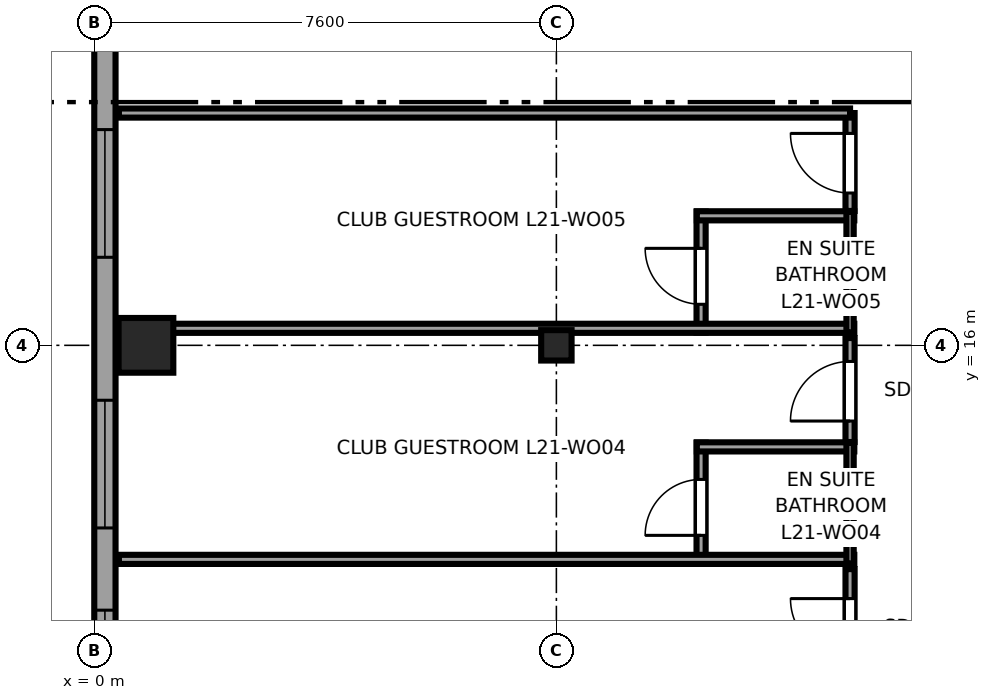
"""IFC4 building model, lengths in metres.
Left out: names, types, materials, properties, quantities, classifications, styles, units other than length and angle.
Written with IfcOpenShell. Run it as: python <this file> out.ifc"""

import sys

from ifc_helpers import new_model, si_unit, direction, frame, frame_2d, origin, origin_2d, place, context, subcontext, project, spatial, rectangle, i_section, extrude, source, transform, mapped, element, fill, save


model = new_model("IFC4")
c1 = context("Model", 3, precision=1e-05, world=origin(), true_north=direction((0.0, 1.0)))
c2 = subcontext(c1, "Body", "Model", "MODEL_VIEW")
j1 = project(units=[si_unit("LENGTHUNIT", "METRE"), si_unit("PLANEANGLEUNIT", "RADIAN")], contexts=[c1])
p1 = place(None, origin())
s1 = spatial("IfcSite", under=j1, at=p1, CompositionType="ELEMENT")
p2 = place(p1, origin())
s2 = spatial("IfcBuilding", under=s1, at=p2, CompositionType="ELEMENT")
p3 = place(p2, frame((0.0, 0.0, 85.25)))
s3 = spatial("IfcBuildingStorey", under=s2, at=p3, CompositionType="ELEMENT", Elevation=85.25)
m1 = source(origin(), c2, "Body", "SweptSolid", [
    extrude(rectangle(XDim=0.9, YDim=0.9, at=origin_2d()), origin(), (0.0, 0.0, 1.0), 3.55),
])
p4 = place(p3, frame((0.85, 16.0, 0.0), z_axis=(0.0, 0.0, 1.0), x_axis=(1.0, 0.0, 0.0)))
e1 = element("IfcColumn", 1, at=p4, inside=s3, PredefinedType="COLUMN", context=c2, shape_type="MappedRepresentation", body=[
    mapped(m1, transform((0.0, 0.0, 0.0), x_axis=(1.0, 0.0, 0.0), y_axis=(0.0, 1.0, 0.0), z_axis=(0.0, 0.0, 1.0), scale=1.0)),
])
m2 = source(origin(), c2, "Body", "SweptSolid", [
    extrude(i_section(OverallWidth=0.5, OverallDepth=0.5, WebThickness=0.022, FlangeThickness=0.034, at=origin_2d()), origin(), (0.0, 0.0, 1.0), 3.55),
])
p5 = place(p3, frame((7.6, 16.0, 0.0), z_axis=(0.0, 0.0, 1.0), x_axis=(1.0, 0.0, 0.0)))
e2 = element("IfcColumn", 2, at=p5, inside=s3, PredefinedType="COLUMN", context=c2, shape_type="MappedRepresentation", body=[
    mapped(m2, transform((0.0, 0.0, 0.0), x_axis=(1.0, 0.0, 0.0), y_axis=(0.0, 1.0, 0.0), z_axis=(0.0, 0.0, 1.0), scale=1.0)),
])
p6 = place(p3, frame((0.175, 41.383, 0.0), z_axis=(0.0, 0.0, 1.0), x_axis=(0.0, -1.0, 0.0)))
e3 = element("IfcWall", 3, at=p6, inside=s3, PredefinedType="SOLIDWALL", context=c2, shape_type="SweptSolid", body=[
    extrude(rectangle(XDim=36.766, YDim=0.35, at=frame_2d((18.383, 0.0))), origin(), (0.0, 0.0, 1.0), 3.37),
])
p7 = place(p6, frame((1.526, 0.0, 0.68)))
e4 = element("IfcOpeningElement", 4, at=p7, cuts=e3, PredefinedType="OPENING", context=c2, shape_type="SweptSolid", body=[
    extrude(rectangle(XDim=2.1, YDim=1.9, at=frame_2d((1.05, 0.95))), frame((0.0, 0.185, 0.0), z_axis=(0.0, -1.0, 0.0), x_axis=(1.0, 0.0, 0.0)), (0.0, 0.0, 1.0), 0.37),
])
p8 = place(p6, frame((4.428, 0.0, 0.68)))
e5 = element("IfcOpeningElement", 5, at=p8, cuts=e3, PredefinedType="OPENING", context=c2, shape_type="SweptSolid", body=[
    extrude(rectangle(XDim=2.1, YDim=1.9, at=frame_2d((1.05, 0.95))), frame((0.0, 0.185, 0.0), z_axis=(0.0, -1.0, 0.0), x_axis=(1.0, 0.0, 0.0)), (0.0, 0.0, 1.0), 0.37),
])
p9 = place(p6, frame((8.879, 0.0, 0.68)))
e6 = element("IfcOpeningElement", 6, at=p9, cuts=e3, PredefinedType="OPENING", context=c2, shape_type="SweptSolid", body=[
    extrude(rectangle(XDim=2.1, YDim=1.9, at=frame_2d((1.05, 0.95))), frame((0.0, 0.185, 0.0), z_axis=(0.0, -1.0, 0.0), x_axis=(1.0, 0.0, 0.0)), (0.0, 0.0, 1.0), 0.37),
])
p10 = place(p6, frame((21.835, 0.0, 0.68)))
e7 = element("IfcOpeningElement", 7, at=p10, cuts=e3, PredefinedType="OPENING", context=c2, shape_type="SweptSolid", body=[
    extrude(rectangle(XDim=2.1, YDim=1.9, at=frame_2d((1.05, 0.95))), frame((0.0, 0.185, 0.0), z_axis=(0.0, -1.0, 0.0), x_axis=(1.0, 0.0, 0.0)), (0.0, 0.0, 1.0), 0.37),
])
p11 = place(p6, frame((26.286, 0.0, 0.68)))
e8 = element("IfcOpeningElement", 8, at=p11, cuts=e3, PredefinedType="OPENING", context=c2, shape_type="SweptSolid", body=[
    extrude(rectangle(XDim=2.1, YDim=1.9, at=frame_2d((1.05, 0.95))), frame((0.0, 0.185, 0.0), z_axis=(0.0, -1.0, 0.0), x_axis=(1.0, 0.0, 0.0)), (0.0, 0.0, 1.0), 0.37),
])
p12 = place(p6, frame((29.738, 0.0, 0.68)))
e9 = element("IfcOpeningElement", 9, at=p12, cuts=e3, PredefinedType="OPENING", context=c2, shape_type="SweptSolid", body=[
    extrude(rectangle(XDim=2.1, YDim=1.9, at=frame_2d((1.05, 0.95))), frame((0.0, 0.185, 0.0), z_axis=(0.0, -1.0, 0.0), x_axis=(1.0, 0.0, 0.0)), (0.0, 0.0, 1.0), 0.37),
])
p13 = place(p6, frame((34.079, 0.0, 0.62)))
e10 = element("IfcOpeningElement", 10, at=p13, cuts=e3, PredefinedType="OPENING", context=c2, shape_type="SweptSolid", body=[
    extrude(rectangle(XDim=1.5, YDim=1.55, at=frame_2d((0.75, 0.775))), frame((0.0, 0.185, 0.0), z_axis=(0.0, -1.0, 0.0), x_axis=(1.0, 0.0, 0.0)), (0.0, 0.0, 1.0), 0.37),
])
p14 = place(p6, frame((16.838, 0.0, 0.62)))
e11 = element("IfcOpeningElement", 11, at=p14, cuts=e3, PredefinedType="OPENING", context=c2, shape_type="SweptSolid", body=[
    extrude(rectangle(XDim=1.5, YDim=1.55, at=frame_2d((0.75, 0.775))), frame((0.0, 0.185, 0.0), z_axis=(0.0, -1.0, 0.0), x_axis=(1.0, 0.0, 0.0)), (0.0, 0.0, 1.0), 0.37),
])
p15 = place(p3, frame((9.98, 12.41, 0.0), z_axis=(0.0, 0.0, 1.0), x_axis=(0.0, 1.0, 0.0)))
e12 = element("IfcWall", 12, at=p15, inside=s3, PredefinedType="PARTITIONING", context=c2, shape_type="SweptSolid", body=[
    extrude(rectangle(XDim=1.99, YDim=0.15, at=frame_2d((0.995, 0.0))), origin(), (0.0, 0.0, 1.0), 3.37),
])
p16 = place(p15, frame((0.465, 0.0, 0.0)))
e13 = element("IfcOpeningElement", 13, at=p16, cuts=e12, PredefinedType="OPENING", context=c2, shape_type="SweptSolid", body=[
    extrude(rectangle(XDim=0.92, YDim=2.01, at=frame_2d((0.46, 1.005))), frame((0.0, 0.085, 0.0), z_axis=(0.0, -1.0, 0.0), x_axis=(1.0, 0.0, 0.0)), (0.0, 0.0, 1.0), 0.17),
])
p17 = place(p3, frame((0.405, 12.48, 0.0), z_axis=(0.0, 0.0, 1.0), x_axis=(1.0, 0.0, 0.0)))
e14 = element("IfcWall", 14, at=p17, inside=s3, PredefinedType="PARTITIONING", context=c2, shape_type="SweptSolid", body=[
    extrude(rectangle(XDim=12.095, YDim=0.15, at=frame_2d((6.047, 0.0))), origin(), (0.0, 0.0, 1.0), 3.37),
])
p18 = place(p3, frame((9.91, 14.33, 0.0), z_axis=(0.0, 0.0, 1.0), x_axis=(1.0, 0.0, 0.0)))
e15 = element("IfcWall", 15, at=p18, inside=s3, PredefinedType="PARTITIONING", context=c2, shape_type="SweptSolid", body=[
    extrude(rectangle(XDim=2.59, YDim=0.15, at=frame_2d((1.295, 0.0))), origin(), (0.0, 0.0, 1.0), 3.37),
])
p19 = place(p3, frame((12.43, 12.41, 0.0), z_axis=(0.0, 0.0, 1.0), x_axis=(0.0, 1.0, 0.0)))
e16 = element("IfcWall", 16, at=p19, inside=s3, PredefinedType="PLUMBINGWALL", context=c2, shape_type="SweptSolid", body=[
    extrude(rectangle(XDim=1.99, YDim=0.12, at=frame_2d((0.995, 0.0))), origin(), (0.0, 0.0, 1.0), 3.37),
])
p20 = place(p3, frame((9.98, 16.21, 0.0), z_axis=(0.0, 0.0, 1.0), x_axis=(0.0, 1.0, 0.0)))
e17 = element("IfcWall", 17, at=p20, inside=s3, PredefinedType="PARTITIONING", context=c2, shape_type="SweptSolid", body=[
    extrude(rectangle(XDim=1.99, YDim=0.15, at=frame_2d((0.995, 0.0))), origin(), (0.0, 0.0, 1.0), 3.37),
])
p21 = place(p20, frame((0.465, 0.0, 0.0)))
e18 = element("IfcOpeningElement", 18, at=p21, cuts=e17, PredefinedType="OPENING", context=c2, shape_type="SweptSolid", body=[
    extrude(rectangle(XDim=0.92, YDim=2.01, at=frame_2d((0.46, 1.005))), frame((0.0, 0.085, 0.0), z_axis=(0.0, -1.0, 0.0), x_axis=(1.0, 0.0, 0.0)), (0.0, 0.0, 1.0), 0.17),
])
p22 = place(p3, frame((0.405, 16.28, 0.0), z_axis=(0.0, 0.0, 1.0), x_axis=(1.0, 0.0, 0.0)))
e19 = element("IfcWall", 19, at=p22, inside=s3, PredefinedType="PARTITIONING", context=c2, shape_type="SweptSolid", body=[
    extrude(rectangle(XDim=12.095, YDim=0.15, at=frame_2d((6.047, 0.0))), origin(), (0.0, 0.0, 1.0), 3.37),
])
p23 = place(p3, frame((9.91, 18.13, 0.0), z_axis=(0.0, 0.0, 1.0), x_axis=(1.0, 0.0, 0.0)))
e20 = element("IfcWall", 20, at=p23, inside=s3, PredefinedType="PARTITIONING", context=c2, shape_type="SweptSolid", body=[
    extrude(rectangle(XDim=2.59, YDim=0.15, at=frame_2d((1.295, 0.0))), origin(), (0.0, 0.0, 1.0), 3.37),
])
p24 = place(p3, frame((12.43, 16.21, 0.0), z_axis=(0.0, 0.0, 1.0), x_axis=(0.0, 1.0, 0.0)))
e21 = element("IfcWall", 21, at=p24, inside=s3, PredefinedType="PLUMBINGWALL", context=c2, shape_type="SweptSolid", body=[
    extrude(rectangle(XDim=1.99, YDim=0.12, at=frame_2d((0.995, 0.0))), origin(), (0.0, 0.0, 1.0), 3.37),
])
p25 = place(p3, frame((12.43, 10.41, 0.0), z_axis=(0.0, 0.0, 1.0), x_axis=(0.0, 1.0, 0.0)))
e22 = element("IfcWall", 22, at=p25, inside=s3, PredefinedType="PARTITIONING", context=c2, shape_type="SweptSolid", body=[
    extrude(rectangle(XDim=1.91, YDim=0.15, at=frame_2d((0.955, 0.0))), origin(), (0.0, 0.0, 1.0), 3.37),
])
p26 = place(p25, frame((0.445, 0.0, 0.0)))
e23 = element("IfcOpeningElement", 23, at=p26, cuts=e22, PredefinedType="OPENING", context=c2, shape_type="SweptSolid", body=[
    extrude(rectangle(XDim=0.98, YDim=2.12, at=frame_2d((0.49, 1.06))), frame((0.0, 0.085, 0.0), z_axis=(0.0, -1.0, 0.0), x_axis=(1.0, 0.0, 0.0)), (0.0, 0.0, 1.0), 0.17),
])
p27 = place(p3, frame((12.43, 14.41, 0.0), z_axis=(0.0, 0.0, 1.0), x_axis=(0.0, 1.0, 0.0)))
e24 = element("IfcWall", 24, at=p27, inside=s3, PredefinedType="PARTITIONING", context=c2, shape_type="SweptSolid", body=[
    extrude(rectangle(XDim=1.71, YDim=0.15, at=frame_2d((0.855, 0.0))), origin(), (0.0, 0.0, 1.0), 3.37),
])
p28 = place(p27, frame((0.345, 0.0, 0.0)))
e25 = element("IfcOpeningElement", 25, at=p28, cuts=e24, PredefinedType="OPENING", context=c2, shape_type="SweptSolid", body=[
    extrude(rectangle(XDim=0.98, YDim=2.12, at=frame_2d((0.49, 1.06))), frame((0.0, 0.085, 0.0), z_axis=(0.0, -1.0, 0.0), x_axis=(1.0, 0.0, 0.0)), (0.0, 0.0, 1.0), 0.17),
])
p29 = place(p3, frame((12.43, 18.21, 0.0), z_axis=(0.0, 0.0, 1.0), x_axis=(0.0, 1.0, 0.0)))
e26 = element("IfcWall", 26, at=p29, inside=s3, PredefinedType="PARTITIONING", context=c2, shape_type="SweptSolid", body=[
    extrude(rectangle(XDim=1.61, YDim=0.15, at=frame_2d((0.805, 0.0))), origin(), (0.0, 0.0, 1.0), 3.37),
])
p30 = place(p29, frame((0.295, 0.0, 0.0)))
e27 = element("IfcOpeningElement", 27, at=p30, cuts=e26, PredefinedType="OPENING", context=c2, shape_type="SweptSolid", body=[
    extrude(rectangle(XDim=0.98, YDim=2.12, at=frame_2d((0.49, 1.06))), frame((0.0, 0.085, 0.0), z_axis=(0.0, -1.0, 0.0), x_axis=(1.0, 0.0, 0.0)), (0.0, 0.0, 1.0), 0.17),
])
p31 = place(p3, frame((0.405, 19.82, 0.0), z_axis=(0.0, 0.0, 1.0), x_axis=(1.0, 0.0, 0.0)))
e28 = element("IfcWall", 28, at=p31, inside=s3, PredefinedType="PARTITIONING", context=c2, shape_type="SweptSolid", body=[
    extrude(rectangle(XDim=12.025, YDim=0.15, at=frame_2d((6.012, 0.0))), origin(), (0.0, 0.0, 1.0), 3.37),
])
m3 = source(origin(), c2, "Body", "SweptSolid", [
    extrude(rectangle(XDim=2.1, YDim=1.9, at=frame_2d((1.05, 0.95))), frame((0.0, 0.09, 0.0), z_axis=(0.0, -1.0, 0.0), x_axis=(1.0, 0.0, 0.0)), (0.0, 0.0, 1.0), 0.06),
])
p32 = place(p10, origin())
e29 = element("IfcWindow", 29, at=p32, inside=s3, PartitioningType="TRIPLE_PANEL_HORIZONTAL", PredefinedType="WINDOW", context=c2, shape_type="MappedRepresentation", body=[
    mapped(m3, transform((0.0, 0.0, 0.0), x_axis=(1.0, 0.0, 0.0), y_axis=(0.0, 1.0, 0.0), z_axis=(0.0, 0.0, 1.0), scale=1.0)),
])
fill(e7, e29)
p33 = place(p11, origin())
e30 = element("IfcWindow", 30, at=p33, inside=s3, PartitioningType="TRIPLE_PANEL_HORIZONTAL", PredefinedType="WINDOW", context=c2, shape_type="MappedRepresentation", body=[
    mapped(m3, transform((0.0, 0.0, 0.0), x_axis=(1.0, 0.0, 0.0), y_axis=(0.0, 1.0, 0.0), z_axis=(0.0, 0.0, 1.0), scale=1.0)),
])
fill(e8, e30)
p34 = place(p12, origin())
e31 = element("IfcWindow", 31, at=p34, inside=s3, PartitioningType="TRIPLE_PANEL_HORIZONTAL", PredefinedType="WINDOW", context=c2, shape_type="MappedRepresentation", body=[
    mapped(m3, transform((0.0, 0.0, 0.0), x_axis=(1.0, 0.0, 0.0), y_axis=(0.0, 1.0, 0.0), z_axis=(0.0, 0.0, 1.0), scale=1.0)),
])
fill(e9, e31)
m4 = source(origin(), c2, "Body", "SweptSolid", [
    extrude(rectangle(XDim=0.92, YDim=2.01, at=frame_2d((0.46, 1.005))), frame((0.0, 0.025, 0.0), z_axis=(0.0, -1.0, 0.0), x_axis=(1.0, 0.0, 0.0)), (0.0, 0.0, 1.0), 0.05),
])
p35 = place(p16, origin())
e32 = element("IfcDoor", 32, at=p35, inside=s3, OperationType="SINGLE_SWING_LEFT", PredefinedType="DOOR", context=c2, shape_type="MappedRepresentation", body=[
    mapped(m4, transform((0.0, 0.0, 0.0), x_axis=(1.0, 0.0, 0.0), y_axis=(0.0, 1.0, 0.0), z_axis=(0.0, 0.0, 1.0), scale=1.0)),
])
fill(e13, e32)
p36 = place(p21, origin())
e33 = element("IfcDoor", 33, at=p36, inside=s3, OperationType="SINGLE_SWING_RIGHT", PredefinedType="DOOR", context=c2, shape_type="MappedRepresentation", body=[
    mapped(m4, transform((0.0, 0.0, 0.0), x_axis=(1.0, 0.0, 0.0), y_axis=(0.0, 1.0, 0.0), z_axis=(0.0, 0.0, 1.0), scale=1.0)),
])
fill(e18, e33)
m5 = source(origin(), c2, "Body", "SweptSolid", [
    extrude(rectangle(XDim=0.98, YDim=2.12, at=frame_2d((0.49, 1.06))), frame((0.0, 0.025, 0.0), z_axis=(0.0, -1.0, 0.0), x_axis=(1.0, 0.0, 0.0)), (0.0, 0.0, 1.0), 0.05),
])
p37 = place(p26, origin())
e34 = element("IfcDoor", 34, at=p37, inside=s3, OperationType="SINGLE_SWING_RIGHT", PredefinedType="DOOR", context=c2, shape_type="MappedRepresentation", body=[
    mapped(m5, transform((0.0, 0.0, 0.0), x_axis=(1.0, 0.0, 0.0), y_axis=(0.0, 1.0, 0.0), z_axis=(0.0, 0.0, 1.0), scale=1.0)),
])
fill(e23, e34)
p38 = place(p28, origin())
e35 = element("IfcDoor", 35, at=p38, inside=s3, OperationType="SINGLE_SWING_LEFT", PredefinedType="DOOR", context=c2, shape_type="MappedRepresentation", body=[
    mapped(m5, transform((0.0, 0.0, 0.0), x_axis=(1.0, 0.0, 0.0), y_axis=(0.0, 1.0, 0.0), z_axis=(0.0, 0.0, 1.0), scale=1.0)),
])
fill(e25, e35)
p39 = place(p30, origin())
e36 = element("IfcDoor", 36, at=p39, inside=s3, OperationType="SINGLE_SWING_RIGHT", PredefinedType="DOOR", context=c2, shape_type="MappedRepresentation", body=[
    mapped(m5, transform((0.0, 0.0, 0.0), x_axis=(1.0, 0.0, 0.0), y_axis=(0.0, 1.0, 0.0), z_axis=(0.0, 0.0, 1.0), scale=1.0)),
])
fill(e27, e36)
save(model, sys.argv[1])
